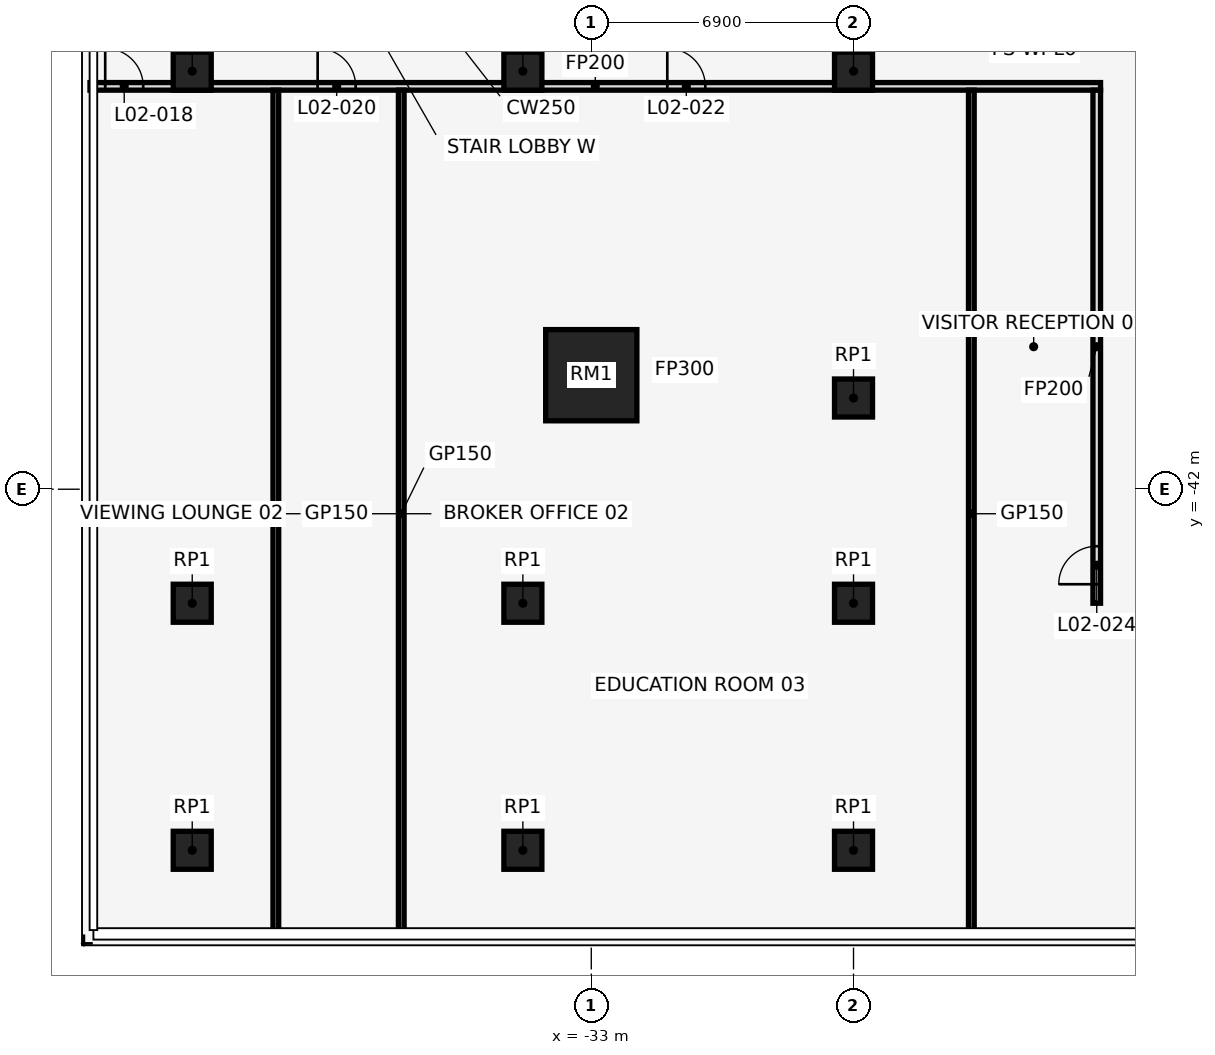
"""IFC4 building model, lengths in metres.
Left out: names, types, materials, properties, quantities, classifications, styles, units other than length and angle.
Written with IfcOpenShell. Run it as: python <this file> out.ifc"""

import sys

from ifc_helpers import new_model, si_unit, direction, frame, frame_2d, origin, origin_2d, place, context, subcontext, project, spatial, rectangle, extrude, element, fill, save


model = new_model("IFC4")
c1 = context("Model", 3, precision=1e-05, world=origin(), true_north=direction((0.0, 1.0)))
c2 = subcontext(c1, "Body", "Model", "MODEL_VIEW")
j1 = project(units=[si_unit("LENGTHUNIT", "METRE"), si_unit("PLANEANGLEUNIT", "RADIAN")], contexts=[c1])
p1 = place(None, origin())
s1 = spatial("IfcSite", under=j1, at=p1, CompositionType="ELEMENT")
p2 = place(p1, origin())
s2 = spatial("IfcBuilding", under=s1, at=p2, CompositionType="ELEMENT")
p3 = place(p2, frame((0.0, 0.0, 14.0)))
s3 = spatial("IfcBuildingStorey", under=s2, at=p3, CompositionType="ELEMENT", Elevation=14.0)
p4 = place(p3, frame((-33.0, -39.0, 0.0), z_axis=(0.0, 0.0, 1.0), x_axis=(1.0, 0.0, 0.0)))
e1 = element("IfcColumn", 1, at=p4, inside=s3, PredefinedType="COLUMN", context=c2, shape_type="SweptSolid", body=[
    extrude(rectangle(XDim=2.4, YDim=2.4, at=origin_2d()), origin(), (0.0, 0.0, 1.0), 6.0),
])
for number, where, z_axis, x_axis in (
    (2, (-26.1, -39.6, 0.0), (0.0, 0.0, 1.0), (1.0, 0.0, 0.0)),
    (3, (-43.5, -31.0, 0.0), (0.0, 0.0, 1.0), (1.0, 0.0, 0.0)),
    (4, (-43.5, -45.0, 0.0), (0.0, 0.0, 1.0), (1.0, 0.0, 0.0)),
    (5, (-43.5, -51.5, 0.0), (0.0, 0.0, 1.0), (1.0, 0.0, 0.0)),
    (6, (-34.8, -31.0, 0.0), (0.0, 0.0, 1.0), (1.0, 0.0, 0.0)),
    (7, (-34.8, -45.0, 0.0), (0.0, 0.0, 1.0), (1.0, 0.0, 0.0)),
    (8, (-34.8, -51.5, 0.0), (0.0, 0.0, 1.0), (1.0, 0.0, 0.0)),
    (9, (-26.1, -31.0, 0.0), (0.0, 0.0, 1.0), (1.0, 0.0, 0.0)),
    (10, (-26.1, -45.0, 0.0), (0.0, 0.0, 1.0), (1.0, 0.0, 0.0)),
    (11, (-26.1, -51.5, 0.0), (0.0, 0.0, 1.0), (1.0, 0.0, 0.0)),
):
    element("IfcColumn", number, at=place(p3, frame(where, z_axis=z_axis, x_axis=x_axis)), inside=s3, PredefinedType="COLUMN", context=c2, shape_type="SweptSolid", body=[
        extrude(rectangle(XDim=1.0, YDim=1.0, at=origin_2d()), origin(), (0.0, 0.0, 1.0), 6.0),
    ])
p5 = place(p3, frame((-46.19, -31.4, 0.0), z_axis=(0.0, 0.0, 1.0), x_axis=(1.0, 0.0, 0.0)))
e12 = element("IfcWall", 12, at=p5, inside=s3, PredefinedType="PARTITIONING", context=c2, shape_type="SweptSolid", body=[
    extrude(rectangle(XDim=26.59, YDim=0.2, at=frame_2d((13.295, 0.0))), origin(), (0.0, 0.0, 1.0), 5.7),
])
p6 = place(p5, frame((0.4, 0.0, 0.0)))
e13 = element("IfcOpeningElement", 13, at=p6, cuts=e12, PredefinedType="OPENING", context=c2, shape_type="SweptSolid", body=[
    extrude(rectangle(XDim=1.0, YDim=2.1, at=frame_2d((0.5, 1.05))), frame((0.0, 0.112, 0.0), z_axis=(0.0, -1.0, 0.0), x_axis=(1.0, 0.0, 0.0)), (0.0, 0.0, 1.0), 0.224),
])
p7 = place(p5, frame((5.99, 0.0, 0.0)))
e14 = element("IfcOpeningElement", 14, at=p7, cuts=e12, PredefinedType="OPENING", context=c2, shape_type="SweptSolid", body=[
    extrude(rectangle(XDim=1.0, YDim=2.1, at=frame_2d((0.5, 1.05))), frame((0.0, 0.112, 0.0), z_axis=(0.0, -1.0, 0.0), x_axis=(1.0, 0.0, 0.0)), (0.0, 0.0, 1.0), 0.224),
])
p8 = place(p5, frame((15.19, 0.0, 0.0)))
e15 = element("IfcOpeningElement", 15, at=p8, cuts=e12, PredefinedType="OPENING", context=c2, shape_type="SweptSolid", body=[
    extrude(rectangle(XDim=1.0, YDim=2.1, at=frame_2d((0.5, 1.05))), frame((0.0, 0.112, 0.0), z_axis=(0.0, -1.0, 0.0), x_axis=(1.0, 0.0, 0.0)), (0.0, 0.0, 1.0), 0.224),
])
for number, where, z_axis, x_axis in (
    (16, (-41.3, -53.79, 0.0), (0.0, 0.0, 1.0), (0.0, 1.0, 0.0)),
    (17, (-38.0, -53.79, 0.0), (0.0, 0.0, 1.0), (0.0, 1.0, 0.0)),
    (18, (-23.0, -53.79, 0.0), (0.0, 0.0, 1.0), (0.0, 1.0, 0.0)),
):
    element("IfcWall", number, at=place(p3, frame(where, z_axis=z_axis, x_axis=x_axis)), inside=s3, PredefinedType="PARTITIONING", context=c2, shape_type="SweptSolid", body=[
        extrude(rectangle(XDim=22.29, YDim=0.15, at=frame_2d((11.145, 0.0))), origin(), (0.0, 0.0, 1.0), 5.7),
    ])
p9 = place(p3, frame((-19.7, -45.0, 0.0), z_axis=(0.0, 0.0, 1.0), x_axis=(0.0, 1.0, 0.0)))
e19 = element("IfcWall", 19, at=p9, inside=s3, PredefinedType="PARTITIONING", context=c2, shape_type="SweptSolid", body=[
    extrude(rectangle(XDim=13.5, YDim=0.2, at=frame_2d((6.75, 0.0))), origin(), (0.0, 0.0, 1.0), 5.7),
])
p10 = place(p9, frame((0.5, 0.0, 0.0)))
e20 = element("IfcOpeningElement", 20, at=p10, cuts=e19, PredefinedType="OPENING", context=c2, shape_type="SweptSolid", body=[
    extrude(rectangle(XDim=1.0, YDim=2.1, at=frame_2d((0.5, 1.05))), frame((0.0, 0.112, 0.0), z_axis=(0.0, -1.0, 0.0), x_axis=(1.0, 0.0, 0.0)), (0.0, 0.0, 1.0), 0.224),
])
p11 = place(p6, frame((1.0, 0.0, 0.0), z_axis=(0.0, 0.0, 1.0), x_axis=(-1.0, 0.0, 0.0)))
e21 = element("IfcDoor", 21, at=p11, inside=s3, OperationType="SINGLE_SWING_RIGHT", PredefinedType="DOOR", context=c2, shape_type="SweptSolid", body=[
    extrude(rectangle(XDim=1.0, YDim=2.1, at=frame_2d((0.5, 1.05))), frame((0.0, 0.025, 0.0), z_axis=(0.0, -1.0, 0.0), x_axis=(1.0, 0.0, 0.0)), (0.0, 0.0, 1.0), 0.05),
])
fill(e13, e21)
p12 = place(p7, frame((1.0, 0.0, 0.0), z_axis=(0.0, 0.0, 1.0), x_axis=(-1.0, 0.0, 0.0)))
e22 = element("IfcDoor", 22, at=p12, inside=s3, OperationType="SINGLE_SWING_RIGHT", PredefinedType="DOOR", context=c2, shape_type="SweptSolid", body=[
    extrude(rectangle(XDim=1.0, YDim=2.1, at=frame_2d((0.5, 1.05))), frame((0.0, 0.025, 0.0), z_axis=(0.0, -1.0, 0.0), x_axis=(1.0, 0.0, 0.0)), (0.0, 0.0, 1.0), 0.05),
])
fill(e14, e22)
p13 = place(p8, frame((1.0, 0.0, 0.0), z_axis=(0.0, 0.0, 1.0), x_axis=(-1.0, 0.0, 0.0)))
e23 = element("IfcDoor", 23, at=p13, inside=s3, OperationType="SINGLE_SWING_LEFT", PredefinedType="DOOR", context=c2, shape_type="SweptSolid", body=[
    extrude(rectangle(XDim=1.0, YDim=2.1, at=frame_2d((0.5, 1.05))), frame((0.0, 0.025, 0.0), z_axis=(0.0, -1.0, 0.0), x_axis=(1.0, 0.0, 0.0)), (0.0, 0.0, 1.0), 0.05),
])
fill(e15, e23)
p14 = place(p10, origin())
e24 = element("IfcDoor", 24, at=p14, inside=s3, OperationType="SINGLE_SWING_RIGHT", PredefinedType="DOOR", context=c2, shape_type="SweptSolid", body=[
    extrude(rectangle(XDim=1.0, YDim=2.1, at=frame_2d((0.5, 1.05))), frame((0.0, 0.025, 0.0), z_axis=(0.0, -1.0, 0.0), x_axis=(1.0, 0.0, 0.0)), (0.0, 0.0, 1.0), 0.05),
])
fill(e20, e24)
save(model, sys.argv[1])
